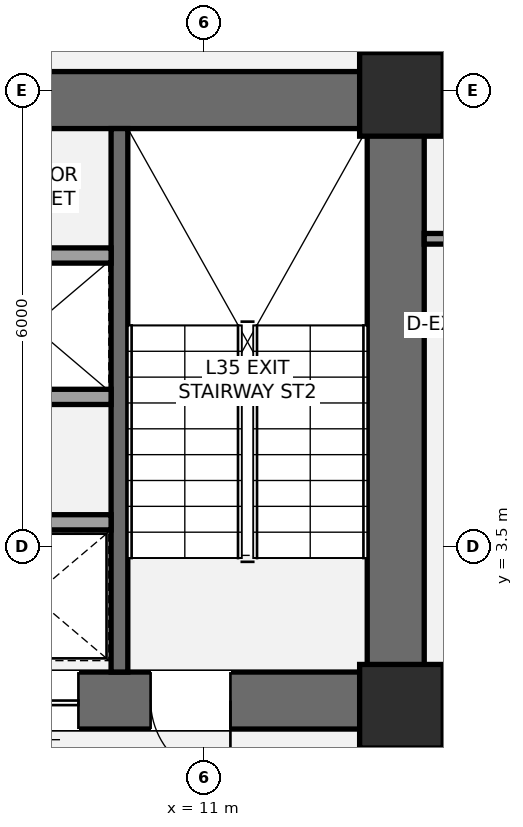
"""IFC4 building model, lengths in metres.
Left out: names, types, materials, properties, quantities, classifications, styles, units other than length and angle.
Written with IfcOpenShell. Run it as: python <this file> out.ifc"""

import sys

from ifc_helpers import new_model, si_unit, direction, frame, frame_2d, origin, origin_2d, place, context, subcontext, project, spatial, rectangle, extrude, element, fill, save


model = new_model("IFC4")
c1 = context("Model", 3, precision=1e-05, world=origin(), true_north=direction((0.0, 1.0)))
c2 = subcontext(c1, "Body", "Model", "MODEL_VIEW")
j1 = project(units=[si_unit("LENGTHUNIT", "METRE"), si_unit("PLANEANGLEUNIT", "RADIAN")], contexts=[c1])
p1 = place(None, origin())
s1 = spatial("IfcSite", under=j1, at=p1, CompositionType="ELEMENT")
p2 = place(p1, origin())
s2 = spatial("IfcBuilding", under=s1, at=p2, CompositionType="ELEMENT")
p3 = place(p2, frame((0.0, 0.0, 131.6)))
s3 = spatial("IfcBuildingStorey", under=s2, at=p3, CompositionType="ELEMENT", Elevation=131.6)
p4 = place(p3, frame((13.525, 1.1, 0.0), z_axis=(0.0, 0.0, 1.0), x_axis=(0.0, 1.0, 0.0)))
e1 = element("IfcWall", 1, at=p4, inside=s3, PredefinedType="SHEAR", context=c2, shape_type="SweptSolid", body=[
    extrude(rectangle(XDim=8.65, YDim=0.75, at=frame_2d((4.325, 0.0))), origin(), (0.0, 0.0, 1.0), 3.5),
])
p5 = place(p3, frame((4.425, 9.375, 0.0), z_axis=(0.0, 0.0, 1.0), x_axis=(1.0, 0.0, 0.0)))
e2 = element("IfcWall", 2, at=p5, inside=s3, PredefinedType="SHEAR", context=c2, shape_type="SweptSolid", body=[
    extrude(rectangle(XDim=9.475, YDim=0.75, at=frame_2d((4.737, 0.0))), origin(), (0.0, 0.0, 1.0), 3.5),
])
p6 = place(p3, frame((13.9, 1.475, 0.0), z_axis=(0.0, 0.0, 1.0), x_axis=(-1.0, 0.0, 0.0)))
e3 = element("IfcWall", 3, at=p6, inside=s3, PredefinedType="SHEAR", context=c2, shape_type="SweptSolid", body=[
    extrude(rectangle(XDim=9.075, YDim=0.75, at=frame_2d((4.538, 0.0))), origin(), (0.0, 0.0, 1.0), 3.5),
])
p7 = place(p6, frame((2.55, 0.0, 0.0)))
e4 = element("IfcOpeningElement", 4, at=p7, cuts=e3, PredefinedType="OPENING", context=c2, shape_type="SweptSolid", body=[
    extrude(rectangle(XDim=1.05, YDim=2.15, at=frame_2d((0.525, 1.075))), frame((0.0, 0.385, 0.0), z_axis=(0.0, -1.0, 0.0), x_axis=(1.0, 0.0, 0.0)), (0.0, 0.0, 1.0), 0.77),
])
p8 = place(p6, frame((4.55, 0.0, 0.0)))
e5 = element("IfcOpeningElement", 5, at=p8, cuts=e3, PredefinedType="OPENING", context=c2, shape_type="SweptSolid", body=[
    extrude(rectangle(XDim=1.1, YDim=2.2, at=frame_2d((0.55, 1.1))), frame((0.0, 0.385, 0.0), z_axis=(0.0, -1.0, 0.0), x_axis=(1.0, 0.0, 0.0)), (0.0, 0.0, 1.0), 0.77),
])
p9 = place(p3, frame((9.89, 1.85, 0.0), z_axis=(0.0, 0.0, 1.0), x_axis=(0.0, 1.0, 0.0)))
e6 = element("IfcWall", 6, at=p9, inside=s3, PredefinedType="SHEAR", context=c2, shape_type="SweptSolid", body=[
    extrude(rectangle(XDim=7.15, YDim=0.22, at=frame_2d((3.575, 0.0))), origin(), (0.0, 0.0, 1.0), 3.5),
])
for number, where, z_axis, x_axis in (
    (7, (13.6, 1.4, 0.0), (0.0, 0.0, 1.0), (1.0, 0.0, 0.0)),
    (8, (13.6, 9.45, 0.0), (0.0, 0.0, 1.0), (1.0, 0.0, 0.0)),
):
    element("IfcColumn", number, at=place(p3, frame(where, z_axis=z_axis, x_axis=x_axis)), inside=s3, PredefinedType="COLUMN", context=c2, shape_type="SweptSolid", body=[
        extrude(rectangle(XDim=1.1, YDim=1.1, at=origin_2d()), origin(), (0.0, 0.0, 1.0), 3.5),
    ])
p10 = place(p3, frame((13.45, -2.15, 0.0), z_axis=(0.0, 0.0, 1.0), x_axis=(0.0, 1.0, 0.0)))
e9 = element("IfcWall", 9, at=p10, inside=s3, PredefinedType="PARTITIONING", context=c2, shape_type="SweptSolid", body=[
    extrude(rectangle(XDim=3.3, YDim=0.165, at=frame_2d((1.65, 0.0))), origin(), (0.0, 0.0, 1.0), 2.713),
])
p11 = place(p10, frame((1.15, 0.0, 0.0)))
e10 = element("IfcOpeningElement", 10, at=p11, cuts=e9, PredefinedType="OPENING", context=c2, shape_type="SweptSolid", body=[
    extrude(rectangle(XDim=1.05, YDim=2.15, at=frame_2d((0.525, 1.075))), frame((0.0, 0.093, 0.0), z_axis=(0.0, -1.0, 0.0), x_axis=(1.0, 0.0, 0.0)), (0.0, 0.0, 1.0), 0.185),
])
p12 = place(p3, frame((5.575, 3.82, 0.0), z_axis=(0.0, 0.0, 1.0), x_axis=(1.0, 0.0, 0.0)))
e11 = element("IfcWall", 11, at=p12, inside=s3, PredefinedType="SOLIDWALL", context=c2, shape_type="SweptSolid", body=[
    extrude(rectangle(XDim=4.205, YDim=0.2, at=frame_2d((2.103, 0.0))), origin(), (0.0, 0.0, 1.0), 3.26),
])
p13 = place(p12, frame((0.65, 0.0, 0.0)))
e12 = element("IfcOpeningElement", 12, at=p13, cuts=e11, PredefinedType="OPENING", context=c2, shape_type="SweptSolid", body=[
    extrude(rectangle(XDim=1.2, YDim=2.2, at=frame_2d((0.6, 1.1))), frame((0.0, 0.11, 0.0), z_axis=(0.0, -1.0, 0.0), x_axis=(1.0, 0.0, 0.0)), (0.0, 0.0, 1.0), 0.22),
])
for number, where, z_axis, x_axis in (
    (13, (5.575, 5.47, 0.0), (0.0, 0.0, 1.0), (1.0, 0.0, 0.0)),
    (14, (5.575, 7.33, 0.0), (0.0, 0.0, 1.0), (1.0, 0.0, 0.0)),
):
    element("IfcWall", number, at=place(p3, frame(where, z_axis=z_axis, x_axis=x_axis)), inside=s3, PredefinedType="SOLIDWALL", context=c2, shape_type="SweptSolid", body=[
        extrude(rectangle(XDim=4.205, YDim=0.2, at=frame_2d((2.103, 0.0))), origin(), (0.0, 0.0, 1.0), 3.26),
    ])
p14 = place(p3, frame((13.9, 7.55, 0.0), z_axis=(0.0, 0.0, 1.0), x_axis=(1.0, 0.0, 0.0)))
e15 = element("IfcWall", 15, at=p14, inside=s3, PredefinedType="PARTITIONING", context=c2, shape_type="SweptSolid", body=[
    extrude(rectangle(XDim=2.6, YDim=0.14, at=frame_2d((1.3, 0.0))), origin(), (0.0, 0.0, 1.0), 2.713),
])
p15 = place(p14, frame((0.32, 0.0, 0.0)))
e16 = element("IfcOpeningElement", 16, at=p15, cuts=e15, PredefinedType="OPENING", context=c2, shape_type="SweptSolid", body=[
    extrude(rectangle(XDim=0.92, YDim=2.15, at=frame_2d((0.46, 1.075))), frame((0.0, 0.08, 0.0), z_axis=(0.0, -1.0, 0.0), x_axis=(1.0, 0.0, 0.0)), (0.0, 0.0, 1.0), 0.16),
])
p16 = place(p7, origin())
e17 = element("IfcDoor", 17, at=p16, inside=s3, OperationType="SINGLE_SWING_LEFT", PredefinedType="DOOR", context=c2, shape_type="SweptSolid", body=[
    extrude(rectangle(XDim=1.05, YDim=2.15, at=frame_2d((0.525, 1.075))), frame((0.0, 0.025, 0.0), z_axis=(0.0, -1.0, 0.0), x_axis=(1.0, 0.0, 0.0)), (0.0, 0.0, 1.0), 0.05),
])
fill(e4, e17)
p17 = place(p8, origin())
e18 = element("IfcDoor", 18, at=p17, inside=s3, OperationType="SLIDING_TO_LEFT", PredefinedType="DOOR", context=c2, shape_type="SweptSolid", body=[
    extrude(rectangle(XDim=1.1, YDim=2.2, at=frame_2d((0.55, 1.1))), frame((0.0, 0.025, 0.0), z_axis=(0.0, -1.0, 0.0), x_axis=(1.0, 0.0, 0.0)), (0.0, 0.0, 1.0), 0.05),
])
fill(e5, e18)
save(model, sys.argv[1])
